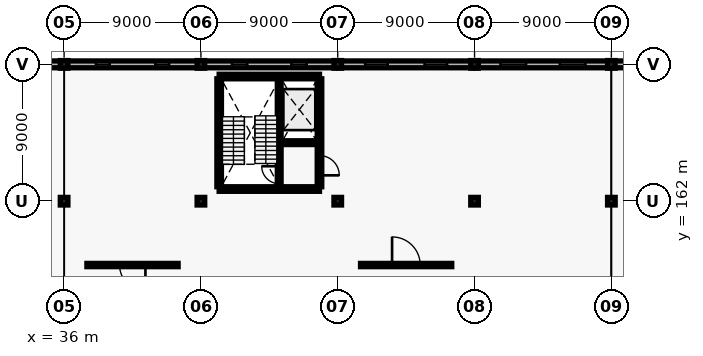
"""IFC4 building model, lengths in metres.
Left out: names, types, materials, properties, quantities, classifications, styles, units other than length and angle.
Written with IfcOpenShell. Run it as: python <this file> out.ifc"""

import sys

from ifc_helpers import new_model, si_unit, direction, frame, frame_2d, origin, origin_2d, place, context, subcontext, project, spatial, rectangle, extrude, element, fill, save


model = new_model("IFC4")
c1 = context("Model", 3, precision=1e-05, world=origin(), true_north=direction((0.0, 1.0)))
c2 = subcontext(c1, "Body", "Model", "MODEL_VIEW")
j1 = project(units=[si_unit("LENGTHUNIT", "METRE"), si_unit("PLANEANGLEUNIT", "RADIAN")], contexts=[c1])
p1 = place(None, origin())
s1 = spatial("IfcSite", under=j1, at=p1, CompositionType="ELEMENT")
p2 = place(p1, origin())
s2 = spatial("IfcBuilding", under=s1, at=p2, CompositionType="ELEMENT")
p3 = place(p2, frame((0.0, 0.0, 9.6)))
s3 = spatial("IfcBuildingStorey", under=s2, at=p3, CompositionType="ELEMENT", Elevation=9.6)
for number, where, z_axis, x_axis in (
    (1, (36.0, 162.0, 0.0), (0.0, 0.0, 1.0), (1.0, 0.0, 0.0)),
    (2, (36.0, 171.0, 0.0), (0.0, 0.0, 1.0), (1.0, 0.0, 0.0)),
    (3, (45.0, 162.0, 0.0), (0.0, 0.0, 1.0), (1.0, 0.0, 0.0)),
    (4, (45.0, 171.0, 0.0), (0.0, 0.0, 1.0), (1.0, 0.0, 0.0)),
    (5, (54.0, 162.0, 0.0), (0.0, 0.0, 1.0), (1.0, 0.0, 0.0)),
    (6, (54.0, 171.0, 0.0), (0.0, 0.0, 1.0), (1.0, 0.0, 0.0)),
    (7, (63.0, 162.0, 0.0), (0.0, 0.0, 1.0), (1.0, 0.0, 0.0)),
    (8, (63.0, 171.0, 0.0), (0.0, 0.0, 1.0), (1.0, 0.0, 0.0)),
    (9, (72.0, 162.0, 0.0), (0.0, 0.0, 1.0), (1.0, 0.0, 0.0)),
    (10, (72.0, 171.0, 0.0), (0.0, 0.0, 1.0), (1.0, 0.0, 0.0)),
):
    element("IfcColumn", number, at=place(p3, frame(where, z_axis=z_axis, x_axis=x_axis)), inside=s3, PredefinedType="COLUMN", context=c2, shape_type="SweptSolid", body=[
        extrude(rectangle(XDim=0.5, YDim=0.5, at=origin_2d()), origin(), (0.0, 0.0, 1.0), 3.9),
    ])
p4 = place(p3, frame((27.06, 171.0, 0.0), z_axis=(0.0, 0.0, 1.0), x_axis=(1.0, 0.0, 0.0)))
e11 = element("IfcWall", 11, at=p4, inside=s3, PredefinedType="SOLIDWALL", context=c2, shape_type="SweptSolid", body=[
    extrude(rectangle(XDim=8.88, YDim=0.45, at=frame_2d((4.44, 0.0))), origin(), (0.0, 0.0, 1.0), 3.15),
])
p5 = place(p4, frame((1.646, 0.0, 0.9)))
e12 = element("IfcOpeningElement", 12, at=p5, cuts=e11, PredefinedType="OPENING", context=c2, shape_type="SweptSolid", body=[
    extrude(rectangle(XDim=1.68, YDim=1.85, at=frame_2d((0.84, 0.925))), frame((0.0, 0.235, 0.0), z_axis=(0.0, -1.0, 0.0), x_axis=(1.0, 0.0, 0.0)), (0.0, 0.0, 1.0), 0.47),
])
p6 = place(p4, frame((5.554, 0.0, 0.9)))
e13 = element("IfcOpeningElement", 13, at=p6, cuts=e11, PredefinedType="OPENING", context=c2, shape_type="SweptSolid", body=[
    extrude(rectangle(XDim=1.68, YDim=1.85, at=frame_2d((0.84, 0.925))), frame((0.0, 0.235, 0.0), z_axis=(0.0, -1.0, 0.0), x_axis=(1.0, 0.0, 0.0)), (0.0, 0.0, 1.0), 0.47),
])
p7 = place(p3, frame((36.06, 171.0, 0.0), z_axis=(0.0, 0.0, 1.0), x_axis=(1.0, 0.0, 0.0)))
e14 = element("IfcWall", 14, at=p7, inside=s3, PredefinedType="SOLIDWALL", context=c2, shape_type="SweptSolid", body=[
    extrude(rectangle(XDim=8.88, YDim=0.45, at=frame_2d((4.44, 0.0))), origin(), (0.0, 0.0, 1.0), 3.15),
])
p8 = place(p7, frame((2.036, 0.0, 0.9)))
e15 = element("IfcOpeningElement", 15, at=p8, cuts=e14, PredefinedType="OPENING", context=c2, shape_type="SweptSolid", body=[
    extrude(rectangle(XDim=0.9, YDim=1.2, at=frame_2d((0.45, 0.6))), frame((0.0, 0.235, 0.0), z_axis=(0.0, -1.0, 0.0), x_axis=(1.0, 0.0, 0.0)), (0.0, 0.0, 1.0), 0.47),
])
p9 = place(p7, frame((5.944, 0.0, 0.9)))
e16 = element("IfcOpeningElement", 16, at=p9, cuts=e14, PredefinedType="OPENING", context=c2, shape_type="SweptSolid", body=[
    extrude(rectangle(XDim=0.9, YDim=1.2, at=frame_2d((0.45, 0.6))), frame((0.0, 0.235, 0.0), z_axis=(0.0, -1.0, 0.0), x_axis=(1.0, 0.0, 0.0)), (0.0, 0.0, 1.0), 0.47),
])
p10 = place(p3, frame((45.06, 171.0, 0.0), z_axis=(0.0, 0.0, 1.0), x_axis=(1.0, 0.0, 0.0)))
e17 = element("IfcWall", 17, at=p10, inside=s3, PredefinedType="SOLIDWALL", context=c2, shape_type="SweptSolid", body=[
    extrude(rectangle(XDim=8.88, YDim=0.45, at=frame_2d((4.44, 0.0))), origin(), (0.0, 0.0, 1.0), 3.15),
])
p11 = place(p10, frame((1.986, 0.0, 0.9)))
e18 = element("IfcOpeningElement", 18, at=p11, cuts=e17, PredefinedType="OPENING", context=c2, shape_type="SweptSolid", body=[
    extrude(rectangle(XDim=1.0, YDim=1.5, at=frame_2d((0.5, 0.75))), frame((0.0, 0.235, 0.0), z_axis=(0.0, -1.0, 0.0), x_axis=(1.0, 0.0, 0.0)), (0.0, 0.0, 1.0), 0.47),
])
p12 = place(p10, frame((5.894, 0.0, 0.9)))
e19 = element("IfcOpeningElement", 19, at=p12, cuts=e17, PredefinedType="OPENING", context=c2, shape_type="SweptSolid", body=[
    extrude(rectangle(XDim=1.0, YDim=1.5, at=frame_2d((0.5, 0.75))), frame((0.0, 0.235, 0.0), z_axis=(0.0, -1.0, 0.0), x_axis=(1.0, 0.0, 0.0)), (0.0, 0.0, 1.0), 0.47),
])
p13 = place(p3, frame((54.06, 171.0, 0.0), z_axis=(0.0, 0.0, 1.0), x_axis=(1.0, 0.0, 0.0)))
e20 = element("IfcWall", 20, at=p13, inside=s3, PredefinedType="SOLIDWALL", context=c2, shape_type="SweptSolid", body=[
    extrude(rectangle(XDim=8.88, YDim=0.45, at=frame_2d((4.44, 0.0))), origin(), (0.0, 0.0, 1.0), 3.15),
])
p14 = place(p13, frame((1.746, 0.0, 0.9)))
e21 = element("IfcOpeningElement", 21, at=p14, cuts=e20, PredefinedType="OPENING", context=c2, shape_type="SweptSolid", body=[
    extrude(rectangle(XDim=1.48, YDim=1.75, at=frame_2d((0.74, 0.875))), frame((0.0, 0.235, 0.0), z_axis=(0.0, -1.0, 0.0), x_axis=(1.0, 0.0, 0.0)), (0.0, 0.0, 1.0), 0.47),
])
p15 = place(p13, frame((5.654, 0.0, 0.9)))
e22 = element("IfcOpeningElement", 22, at=p15, cuts=e20, PredefinedType="OPENING", context=c2, shape_type="SweptSolid", body=[
    extrude(rectangle(XDim=1.48, YDim=1.75, at=frame_2d((0.74, 0.875))), frame((0.0, 0.235, 0.0), z_axis=(0.0, -1.0, 0.0), x_axis=(1.0, 0.0, 0.0)), (0.0, 0.0, 1.0), 0.47),
])
p16 = place(p3, frame((63.06, 171.0, 0.0), z_axis=(0.0, 0.0, 1.0), x_axis=(1.0, 0.0, 0.0)))
e23 = element("IfcWall", 23, at=p16, inside=s3, PredefinedType="SOLIDWALL", context=c2, shape_type="SweptSolid", body=[
    extrude(rectangle(XDim=8.88, YDim=0.45, at=frame_2d((4.44, 0.0))), origin(), (0.0, 0.0, 1.0), 3.15),
])
p17 = place(p16, frame((1.646, 0.0, 0.9)))
e24 = element("IfcOpeningElement", 24, at=p17, cuts=e23, PredefinedType="OPENING", context=c2, shape_type="SweptSolid", body=[
    extrude(rectangle(XDim=1.68, YDim=1.85, at=frame_2d((0.84, 0.925))), frame((0.0, 0.235, 0.0), z_axis=(0.0, -1.0, 0.0), x_axis=(1.0, 0.0, 0.0)), (0.0, 0.0, 1.0), 0.47),
])
p18 = place(p16, frame((5.554, 0.0, 0.9)))
e25 = element("IfcOpeningElement", 25, at=p18, cuts=e23, PredefinedType="OPENING", context=c2, shape_type="SweptSolid", body=[
    extrude(rectangle(XDim=1.68, YDim=1.85, at=frame_2d((0.84, 0.925))), frame((0.0, 0.235, 0.0), z_axis=(0.0, -1.0, 0.0), x_axis=(1.0, 0.0, 0.0)), (0.0, 0.0, 1.0), 0.47),
])
p19 = place(p3, frame((72.06, 171.0, 0.0), z_axis=(0.0, 0.0, 1.0), x_axis=(1.0, 0.0, 0.0)))
e26 = element("IfcWall", 26, at=p19, inside=s3, PredefinedType="SOLIDWALL", context=c2, shape_type="SweptSolid", body=[
    extrude(rectangle(XDim=8.88, YDim=0.45, at=frame_2d((4.44, 0.0))), origin(), (0.0, 0.0, 1.0), 3.15),
])
p20 = place(p19, frame((2.036, 0.0, 0.9)))
e27 = element("IfcOpeningElement", 27, at=p20, cuts=e26, PredefinedType="OPENING", context=c2, shape_type="SweptSolid", body=[
    extrude(rectangle(XDim=0.9, YDim=1.2, at=frame_2d((0.45, 0.6))), frame((0.0, 0.235, 0.0), z_axis=(0.0, -1.0, 0.0), x_axis=(1.0, 0.0, 0.0)), (0.0, 0.0, 1.0), 0.47),
])
p21 = place(p19, frame((5.944, 0.0, 0.9)))
e28 = element("IfcOpeningElement", 28, at=p21, cuts=e26, PredefinedType="OPENING", context=c2, shape_type="SweptSolid", body=[
    extrude(rectangle(XDim=0.9, YDim=1.2, at=frame_2d((0.45, 0.6))), frame((0.0, 0.235, 0.0), z_axis=(0.0, -1.0, 0.0), x_axis=(1.0, 0.0, 0.0)), (0.0, 0.0, 1.0), 0.47),
])
for number, where, z_axis, x_axis in (
    (29, (46.2, 162.8, 0.0), (0.0, 0.0, 1.0), (1.0, 0.0, 0.0)),
    (30, (46.2, 170.2, 0.0), (0.0, 0.0, 1.0), (1.0, 0.0, 0.0)),
):
    element("IfcWall", number, at=place(p3, frame(where, z_axis=z_axis, x_axis=x_axis)), inside=s3, PredefinedType="SHEAR", context=c2, shape_type="SweptSolid", body=[
        extrude(rectangle(XDim=6.6, YDim=0.3, at=frame_2d((3.3, 0.0))), origin(), (0.0, 0.0, 1.0), 3.9),
    ])
p22 = place(p3, frame((46.2, 162.95, 0.0), z_axis=(0.0, 0.0, 1.0), x_axis=(0.0, 1.0, 0.0)))
e31 = element("IfcWall", 31, at=p22, inside=s3, PredefinedType="SHEAR", context=c2, shape_type="SweptSolid", body=[
    extrude(rectangle(XDim=7.1, YDim=0.3, at=frame_2d((3.55, 0.0))), origin(), (0.0, 0.0, 1.0), 3.9),
])
p23 = place(p3, frame((52.8, 162.95, 0.0), z_axis=(0.0, 0.0, 1.0), x_axis=(0.0, 1.0, 0.0)))
e32 = element("IfcWall", 32, at=p23, inside=s3, PredefinedType="SHEAR", context=c2, shape_type="SweptSolid", body=[
    extrude(rectangle(XDim=7.1, YDim=0.3, at=frame_2d((3.55, 0.0))), origin(), (0.0, 0.0, 1.0), 3.9),
])
p24 = place(p23, frame((0.75, 0.0, 0.0)))
e33 = element("IfcOpeningElement", 33, at=p24, cuts=e32, PredefinedType="OPENING", context=c2, shape_type="SweptSolid", body=[
    extrude(rectangle(XDim=1.3, YDim=2.15, at=frame_2d((0.65, 1.075))), frame((0.0, 0.16, 0.0), z_axis=(0.0, -1.0, 0.0), x_axis=(1.0, 0.0, 0.0)), (0.0, 0.0, 1.0), 0.32),
])
p25 = place(p3, frame((50.15, 162.95, 0.0), z_axis=(0.0, 0.0, 1.0), x_axis=(0.0, 1.0, 0.0)))
e34 = element("IfcWall", 34, at=p25, inside=s3, PredefinedType="SHEAR", context=c2, shape_type="SweptSolid", body=[
    extrude(rectangle(XDim=7.1, YDim=0.25, at=frame_2d((3.55, 0.0))), origin(), (0.0, 0.0, 1.0), 3.9),
])
p26 = place(p25, frame((0.2, 0.0, 0.0)))
e35 = element("IfcOpeningElement", 35, at=p26, cuts=e34, PredefinedType="OPENING", context=c2, shape_type="SweptSolid", body=[
    extrude(rectangle(XDim=1.15, YDim=2.15, at=frame_2d((0.575, 1.075))), frame((0.0, 0.135, 0.0), z_axis=(0.0, -1.0, 0.0), x_axis=(1.0, 0.0, 0.0)), (0.0, 0.0, 1.0), 0.27),
])
p27 = place(p3, frame((50.27, 165.85, 0.0), z_axis=(0.0, 0.0, 1.0), x_axis=(1.0, 0.0, 0.0)))
e36 = element("IfcWall", 36, at=p27, inside=s3, PredefinedType="SHEAR", context=c2, shape_type="SweptSolid", body=[
    extrude(rectangle(XDim=2.38, YDim=0.25, at=frame_2d((1.19, 0.0))), origin(), (0.0, 0.0, 1.0), 3.9),
])
p28 = place(p27, frame((0.39, 0.0, 0.0)))
e37 = element("IfcOpeningElement", 37, at=p28, cuts=e36, PredefinedType="OPENING", context=c2, shape_type="SweptSolid", body=[
    extrude(rectangle(XDim=1.6, YDim=2.3, at=frame_2d((0.8, 1.15))), frame((0.0, 0.135, 0.0), z_axis=(0.0, -1.0, 0.0), x_axis=(1.0, 0.0, 0.0)), (0.0, 0.0, 1.0), 0.27),
])
p29 = place(p3, frame((37.5, 157.8, 0.0), z_axis=(0.0, 0.0, 1.0), x_axis=(1.0, 0.0, 0.0)))
e38 = element("IfcWall", 38, at=p29, inside=s3, PredefinedType="PARTITIONING", context=c2, shape_type="SweptSolid", body=[
    extrude(rectangle(XDim=6.0, YDim=0.215, at=frame_2d((3.0, 0.0))), origin(), (0.0, 0.0, 1.0), 2.9),
])
p30 = place(p29, frame((2.15, 0.0, 0.0)))
e39 = element("IfcOpeningElement", 39, at=p30, cuts=e38, PredefinedType="OPENING", context=c2, shape_type="SweptSolid", body=[
    extrude(rectangle(XDim=1.7, YDim=2.35, at=frame_2d((0.85, 1.175))), frame((0.0, 0.117, 0.0), z_axis=(0.0, -1.0, 0.0), x_axis=(1.0, 0.0, 0.0)), (0.0, 0.0, 1.0), 0.235),
])
p31 = place(p3, frame((55.5, 157.8, 0.0), z_axis=(0.0, 0.0, 1.0), x_axis=(1.0, 0.0, 0.0)))
e40 = element("IfcWall", 40, at=p31, inside=s3, PredefinedType="PARTITIONING", context=c2, shape_type="SweptSolid", body=[
    extrude(rectangle(XDim=6.0, YDim=0.215, at=frame_2d((3.0, 0.0))), origin(), (0.0, 0.0, 1.0), 2.9),
])
p32 = place(p31, frame((2.075, 0.0, 0.0)))
e41 = element("IfcOpeningElement", 41, at=p32, cuts=e40, PredefinedType="OPENING", context=c2, shape_type="SweptSolid", body=[
    extrude(rectangle(XDim=1.85, YDim=2.35, at=frame_2d((0.925, 1.175))), frame((0.0, 0.117, 0.0), z_axis=(0.0, -1.0, 0.0), x_axis=(1.0, 0.0, 0.0)), (0.0, 0.0, 1.0), 0.235),
])
p33 = place(p8, origin())
e42 = element("IfcWindow", 42, at=p33, inside=s3, PartitioningType="SINGLE_PANEL", PredefinedType="WINDOW", context=c2, shape_type="SweptSolid", body=[
    extrude(rectangle(XDim=0.9, YDim=1.2, at=frame_2d((0.45, 0.6))), frame((0.0, 0.03, 0.0), z_axis=(0.0, -1.0, 0.0), x_axis=(1.0, 0.0, 0.0)), (0.0, 0.0, 1.0), 0.06),
])
fill(e15, e42)
p34 = place(p9, origin())
e43 = element("IfcWindow", 43, at=p34, inside=s3, PartitioningType="SINGLE_PANEL", PredefinedType="WINDOW", context=c2, shape_type="SweptSolid", body=[
    extrude(rectangle(XDim=0.9, YDim=1.2, at=frame_2d((0.45, 0.6))), frame((0.0, 0.03, 0.0), z_axis=(0.0, -1.0, 0.0), x_axis=(1.0, 0.0, 0.0)), (0.0, 0.0, 1.0), 0.06),
])
fill(e16, e43)
p35 = place(p11, origin())
e44 = element("IfcWindow", 44, at=p35, inside=s3, PartitioningType="SINGLE_PANEL", PredefinedType="WINDOW", context=c2, shape_type="SweptSolid", body=[
    extrude(rectangle(XDim=1.0, YDim=1.5, at=frame_2d((0.5, 0.75))), frame((0.0, 0.03, 0.0), z_axis=(0.0, -1.0, 0.0), x_axis=(1.0, 0.0, 0.0)), (0.0, 0.0, 1.0), 0.06),
])
fill(e18, e44)
p36 = place(p12, origin())
e45 = element("IfcWindow", 45, at=p36, inside=s3, PartitioningType="SINGLE_PANEL", PredefinedType="WINDOW", context=c2, shape_type="SweptSolid", body=[
    extrude(rectangle(XDim=1.0, YDim=1.5, at=frame_2d((0.5, 0.75))), frame((0.0, 0.03, 0.0), z_axis=(0.0, -1.0, 0.0), x_axis=(1.0, 0.0, 0.0)), (0.0, 0.0, 1.0), 0.06),
])
fill(e19, e45)
p37 = place(p14, origin())
e46 = element("IfcWindow", 46, at=p37, inside=s3, PartitioningType="SINGLE_PANEL", PredefinedType="WINDOW", context=c2, shape_type="SweptSolid", body=[
    extrude(rectangle(XDim=1.48, YDim=1.75, at=frame_2d((0.74, 0.875))), frame((0.0, 0.03, 0.0), z_axis=(0.0, -1.0, 0.0), x_axis=(1.0, 0.0, 0.0)), (0.0, 0.0, 1.0), 0.06),
])
fill(e21, e46)
p38 = place(p15, origin())
e47 = element("IfcWindow", 47, at=p38, inside=s3, PartitioningType="SINGLE_PANEL", PredefinedType="WINDOW", context=c2, shape_type="SweptSolid", body=[
    extrude(rectangle(XDim=1.48, YDim=1.75, at=frame_2d((0.74, 0.875))), frame((0.0, 0.03, 0.0), z_axis=(0.0, -1.0, 0.0), x_axis=(1.0, 0.0, 0.0)), (0.0, 0.0, 1.0), 0.06),
])
fill(e22, e47)
p39 = place(p17, origin())
e48 = element("IfcWindow", 48, at=p39, inside=s3, PartitioningType="SINGLE_PANEL", PredefinedType="WINDOW", context=c2, shape_type="SweptSolid", body=[
    extrude(rectangle(XDim=1.68, YDim=1.85, at=frame_2d((0.84, 0.925))), frame((0.0, 0.03, 0.0), z_axis=(0.0, -1.0, 0.0), x_axis=(1.0, 0.0, 0.0)), (0.0, 0.0, 1.0), 0.06),
])
fill(e24, e48)
p40 = place(p18, origin())
e49 = element("IfcWindow", 49, at=p40, inside=s3, PartitioningType="SINGLE_PANEL", PredefinedType="WINDOW", context=c2, shape_type="SweptSolid", body=[
    extrude(rectangle(XDim=1.68, YDim=1.85, at=frame_2d((0.84, 0.925))), frame((0.0, 0.03, 0.0), z_axis=(0.0, -1.0, 0.0), x_axis=(1.0, 0.0, 0.0)), (0.0, 0.0, 1.0), 0.06),
])
fill(e25, e49)
p41 = place(p24, frame((1.3, 0.0, 0.0), z_axis=(0.0, 0.0, 1.0), x_axis=(-1.0, 0.0, 0.0)))
e50 = element("IfcDoor", 50, at=p41, inside=s3, OperationType="DOUBLE_DOOR_SINGLE_SWING", PredefinedType="DOOR", context=c2, shape_type="SweptSolid", body=[
    extrude(rectangle(XDim=1.3, YDim=2.15, at=frame_2d((0.65, 1.075))), frame((0.0, 0.025, 0.0), z_axis=(0.0, -1.0, 0.0), x_axis=(1.0, 0.0, 0.0)), (0.0, 0.0, 1.0), 0.05),
])
fill(e33, e50)
p42 = place(p26, frame((1.15, 0.0, 0.0), z_axis=(0.0, 0.0, 1.0), x_axis=(-1.0, 0.0, 0.0)))
e51 = element("IfcDoor", 51, at=p42, inside=s3, OperationType="SINGLE_SWING_RIGHT", PredefinedType="DOOR", context=c2, shape_type="SweptSolid", body=[
    extrude(rectangle(XDim=1.15, YDim=2.15, at=frame_2d((0.575, 1.075))), frame((0.0, 0.025, 0.0), z_axis=(0.0, -1.0, 0.0), x_axis=(1.0, 0.0, 0.0)), (0.0, 0.0, 1.0), 0.05),
])
fill(e35, e51)
p43 = place(p28, origin())
e52 = element("IfcDoor", 52, at=p43, inside=s3, OperationType="SLIDING_TO_LEFT", PredefinedType="DOOR", context=c2, shape_type="SweptSolid", body=[
    extrude(rectangle(XDim=1.6, YDim=2.3, at=frame_2d((0.8, 1.15))), frame((0.0, 0.025, 0.0), z_axis=(0.0, -1.0, 0.0), x_axis=(1.0, 0.0, 0.0)), (0.0, 0.0, 1.0), 0.05),
])
fill(e37, e52)
p44 = place(p30, origin())
e53 = element("IfcDoor", 53, at=p44, inside=s3, OperationType="SINGLE_SWING_RIGHT", PredefinedType="DOOR", context=c2, shape_type="SweptSolid", body=[
    extrude(rectangle(XDim=1.7, YDim=2.35, at=frame_2d((0.85, 1.175))), frame((0.0, 0.025, 0.0), z_axis=(0.0, -1.0, 0.0), x_axis=(1.0, 0.0, 0.0)), (0.0, 0.0, 1.0), 0.05),
])
fill(e39, e53)
p45 = place(p32, origin())
e54 = element("IfcDoor", 54, at=p45, inside=s3, OperationType="SINGLE_SWING_LEFT", PredefinedType="DOOR", context=c2, shape_type="SweptSolid", body=[
    extrude(rectangle(XDim=1.85, YDim=2.35, at=frame_2d((0.925, 1.175))), frame((0.0, 0.025, 0.0), z_axis=(0.0, -1.0, 0.0), x_axis=(1.0, 0.0, 0.0)), (0.0, 0.0, 1.0), 0.05),
])
fill(e41, e54)
save(model, sys.argv[1])
